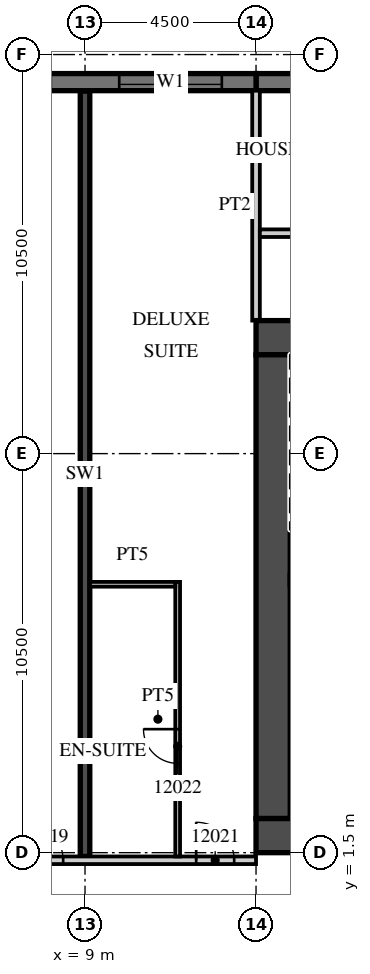
"""IFC4 building model, lengths in metres.
Left out: names, types, materials, properties, quantities, classifications, styles, units other than length and angle.
Written with IfcOpenShell. Run it as: python <this file> out.ifc"""

import sys

from ifc_helpers import new_model, si_unit, direction, frame, frame_2d, origin, place, context, subcontext, project, spatial, rectangle, extrude, element, fill, save


model = new_model("IFC4")
c1 = context("Model", 3, precision=1e-05, world=origin(), true_north=direction((0.0, 1.0)))
c2 = subcontext(c1, "Body", "Model", "MODEL_VIEW")
j1 = project(units=[si_unit("LENGTHUNIT", "METRE"), si_unit("PLANEANGLEUNIT", "RADIAN")], contexts=[c1])
p1 = place(None, origin())
s1 = spatial("IfcSite", under=j1, at=p1, CompositionType="ELEMENT")
p2 = place(p1, origin())
s2 = spatial("IfcBuilding", under=s1, at=p2, CompositionType="ELEMENT")
p3 = place(p2, frame((0.0, 0.0, 69.9)))
s3 = spatial("IfcBuildingStorey", under=s2, at=p3, CompositionType="ELEMENT", Elevation=69.9)
p4 = place(p3, frame((9.0, 1.4, 0.0), z_axis=(0.0, 0.0, 1.0), x_axis=(0.0, 1.0, 0.0)))
e1 = element("IfcWall", 1, at=p4, inside=s3, PredefinedType="SHEAR", context=c2, shape_type="SweptSolid", body=[
    extrude(rectangle(XDim=20.14, YDim=0.25, at=frame_2d((10.07, 0.0))), origin(), (0.0, 0.0, 1.0), 3.3),
])
p5 = place(p3, frame((31.5, 21.775, 0.0), z_axis=(0.0, 0.0, 1.0), x_axis=(-1.0, 0.0, 0.0)))
e2 = element("IfcWall", 2, at=p5, inside=s3, PredefinedType="SOLIDWALL", context=c2, shape_type="SweptSolid", body=[
    extrude(rectangle(XDim=18.0, YDim=0.45, at=frame_2d((9.0, 0.0))), origin(), (0.0, 0.0, 1.0), 3.02),
])
p6 = place(p3, frame((13.5, 21.775, 0.0), z_axis=(0.0, 0.0, 1.0), x_axis=(-1.0, 0.0, 0.0)))
e3 = element("IfcWall", 3, at=p6, inside=s3, PredefinedType="SOLIDWALL", context=c2, shape_type="SweptSolid", body=[
    extrude(rectangle(XDim=54.5, YDim=0.45, at=frame_2d((27.25, 0.0))), origin(), (0.0, 0.0, 1.0), 3.02),
])
p7 = place(p6, frame((0.9, 0.0, 0.45)))
e4 = element("IfcOpeningElement", 4, at=p7, cuts=e3, PredefinedType="OPENING", context=c2, shape_type="SweptSolid", body=[
    extrude(rectangle(XDim=2.7, YDim=2.25, at=frame_2d((1.35, 1.125))), frame((0.0, 0.235, 0.0), z_axis=(0.0, -1.0, 0.0), x_axis=(1.0, 0.0, 0.0)), (0.0, 0.0, 1.0), 0.47),
])
p8 = place(p6, frame((5.4, 0.0, 0.45)))
e5 = element("IfcOpeningElement", 5, at=p8, cuts=e3, PredefinedType="OPENING", context=c2, shape_type="SweptSolid", body=[
    extrude(rectangle(XDim=2.7, YDim=2.25, at=frame_2d((1.35, 1.125))), frame((0.0, 0.235, 0.0), z_axis=(0.0, -1.0, 0.0), x_axis=(1.0, 0.0, 0.0)), (0.0, 0.0, 1.0), 0.47),
])
p9 = place(p6, frame((9.9, 0.0, 0.45)))
e6 = element("IfcOpeningElement", 6, at=p9, cuts=e3, PredefinedType="OPENING", context=c2, shape_type="SweptSolid", body=[
    extrude(rectangle(XDim=2.7, YDim=2.25, at=frame_2d((1.35, 1.125))), frame((0.0, 0.235, 0.0), z_axis=(0.0, -1.0, 0.0), x_axis=(1.0, 0.0, 0.0)), (0.0, 0.0, 1.0), 0.47),
])
p10 = place(p6, frame((14.4, 0.0, 0.45)))
e7 = element("IfcOpeningElement", 7, at=p10, cuts=e3, PredefinedType="OPENING", context=c2, shape_type="SweptSolid", body=[
    extrude(rectangle(XDim=2.7, YDim=2.25, at=frame_2d((1.35, 1.125))), frame((0.0, 0.235, 0.0), z_axis=(0.0, -1.0, 0.0), x_axis=(1.0, 0.0, 0.0)), (0.0, 0.0, 1.0), 0.47),
])
p11 = place(p6, frame((18.9, 0.0, 0.45)))
e8 = element("IfcOpeningElement", 8, at=p11, cuts=e3, PredefinedType="OPENING", context=c2, shape_type="SweptSolid", body=[
    extrude(rectangle(XDim=2.7, YDim=2.25, at=frame_2d((1.35, 1.125))), frame((0.0, 0.235, 0.0), z_axis=(0.0, -1.0, 0.0), x_axis=(1.0, 0.0, 0.0)), (0.0, 0.0, 1.0), 0.47),
])
p12 = place(p6, frame((23.4, 0.0, 0.45)))
e9 = element("IfcOpeningElement", 9, at=p12, cuts=e3, PredefinedType="OPENING", context=c2, shape_type="SweptSolid", body=[
    extrude(rectangle(XDim=2.7, YDim=2.25, at=frame_2d((1.35, 1.125))), frame((0.0, 0.235, 0.0), z_axis=(0.0, -1.0, 0.0), x_axis=(1.0, 0.0, 0.0)), (0.0, 0.0, 1.0), 0.47),
])
p13 = place(p6, frame((27.9, 0.0, 0.45)))
e10 = element("IfcOpeningElement", 10, at=p13, cuts=e3, PredefinedType="OPENING", context=c2, shape_type="SweptSolid", body=[
    extrude(rectangle(XDim=2.7, YDim=2.25, at=frame_2d((1.35, 1.125))), frame((0.0, 0.235, 0.0), z_axis=(0.0, -1.0, 0.0), x_axis=(1.0, 0.0, 0.0)), (0.0, 0.0, 1.0), 0.47),
])
p14 = place(p6, frame((32.4, 0.0, 0.45)))
e11 = element("IfcOpeningElement", 11, at=p14, cuts=e3, PredefinedType="OPENING", context=c2, shape_type="SweptSolid", body=[
    extrude(rectangle(XDim=2.7, YDim=2.25, at=frame_2d((1.35, 1.125))), frame((0.0, 0.235, 0.0), z_axis=(0.0, -1.0, 0.0), x_axis=(1.0, 0.0, 0.0)), (0.0, 0.0, 1.0), 0.47),
])
p15 = place(p6, frame((36.9, 0.0, 0.45)))
e12 = element("IfcOpeningElement", 12, at=p15, cuts=e3, PredefinedType="OPENING", context=c2, shape_type="SweptSolid", body=[
    extrude(rectangle(XDim=2.7, YDim=2.25, at=frame_2d((1.35, 1.125))), frame((0.0, 0.235, 0.0), z_axis=(0.0, -1.0, 0.0), x_axis=(1.0, 0.0, 0.0)), (0.0, 0.0, 1.0), 0.47),
])
p16 = place(p6, frame((41.4, 0.0, 0.45)))
e13 = element("IfcOpeningElement", 13, at=p16, cuts=e3, PredefinedType="OPENING", context=c2, shape_type="SweptSolid", body=[
    extrude(rectangle(XDim=2.7, YDim=2.25, at=frame_2d((1.35, 1.125))), frame((0.0, 0.235, 0.0), z_axis=(0.0, -1.0, 0.0), x_axis=(1.0, 0.0, 0.0)), (0.0, 0.0, 1.0), 0.47),
])
p17 = place(p6, frame((45.9, 0.0, 0.45)))
e14 = element("IfcOpeningElement", 14, at=p17, cuts=e3, PredefinedType="OPENING", context=c2, shape_type="SweptSolid", body=[
    extrude(rectangle(XDim=2.7, YDim=2.25, at=frame_2d((1.35, 1.125))), frame((0.0, 0.235, 0.0), z_axis=(0.0, -1.0, 0.0), x_axis=(1.0, 0.0, 0.0)), (0.0, 0.0, 1.0), 0.47),
])
p18 = place(p6, frame((50.4, 0.0, 0.45)))
e15 = element("IfcOpeningElement", 15, at=p18, cuts=e3, PredefinedType="OPENING", context=c2, shape_type="SweptSolid", body=[
    extrude(rectangle(XDim=2.7, YDim=2.25, at=frame_2d((1.35, 1.125))), frame((0.0, 0.235, 0.0), z_axis=(0.0, -1.0, 0.0), x_axis=(1.0, 0.0, 0.0)), (0.0, 0.0, 1.0), 0.47),
])
p19 = place(p3, frame((13.5, 15.5, 0.0), z_axis=(0.0, 0.0, 1.0), x_axis=(0.0, 1.0, 0.0)))
e16 = element("IfcWall", 16, at=p19, inside=s3, PredefinedType="PARTITIONING", context=c2, shape_type="SweptSolid", body=[
    extrude(rectangle(XDim=6.05, YDim=0.2, at=frame_2d((3.025, 0.0))), origin(), (0.0, 0.0, 1.0), 3.02),
])
p20 = place(p3, frame((-44.55, 1.3, 0.0), z_axis=(0.0, 0.0, 1.0), x_axis=(1.0, 0.0, 0.0)))
e17 = element("IfcWall", 17, at=p20, inside=s3, PredefinedType="PARTITIONING", context=c2, shape_type="SweptSolid", body=[
    extrude(rectangle(XDim=58.05, YDim=0.2, at=frame_2d((29.025, 0.0))), origin(), (0.0, 0.0, 1.0), 3.02),
])
p21 = place(p20, frame((0.525, 0.0, 0.0)))
e18 = element("IfcOpeningElement", 18, at=p21, cuts=e17, PredefinedType="OPENING", context=c2, shape_type="SweptSolid", body=[
    extrude(rectangle(XDim=1.0, YDim=2.1, at=frame_2d((0.5, 1.05))), frame((0.0, 0.11, 0.0), z_axis=(0.0, -1.0, 0.0), x_axis=(1.0, 0.0, 0.0)), (0.0, 0.0, 1.0), 0.22),
])
p22 = place(p20, frame((6.975, 0.0, 0.0)))
e19 = element("IfcOpeningElement", 19, at=p22, cuts=e17, PredefinedType="OPENING", context=c2, shape_type="SweptSolid", body=[
    extrude(rectangle(XDim=1.0, YDim=2.1, at=frame_2d((0.5, 1.05))), frame((0.0, 0.11, 0.0), z_axis=(0.0, -1.0, 0.0), x_axis=(1.0, 0.0, 0.0)), (0.0, 0.0, 1.0), 0.22),
])
p23 = place(p20, frame((9.125, 0.0, 0.0)))
e20 = element("IfcOpeningElement", 20, at=p23, cuts=e17, PredefinedType="OPENING", context=c2, shape_type="SweptSolid", body=[
    extrude(rectangle(XDim=1.0, YDim=2.1, at=frame_2d((0.5, 1.05))), frame((0.0, 0.11, 0.0), z_axis=(0.0, -1.0, 0.0), x_axis=(1.0, 0.0, 0.0)), (0.0, 0.0, 1.0), 0.22),
])
p24 = place(p20, frame((13.6, 0.0, 0.0)))
e21 = element("IfcOpeningElement", 21, at=p24, cuts=e17, PredefinedType="OPENING", context=c2, shape_type="SweptSolid", body=[
    extrude(rectangle(XDim=1.0, YDim=2.1, at=frame_2d((0.5, 1.05))), frame((0.0, 0.11, 0.0), z_axis=(0.0, -1.0, 0.0), x_axis=(1.0, 0.0, 0.0)), (0.0, 0.0, 1.0), 0.22),
])
p25 = place(p20, frame((19.987, 0.0, 0.0)))
e22 = element("IfcOpeningElement", 22, at=p25, cuts=e17, PredefinedType="OPENING", context=c2, shape_type="SweptSolid", body=[
    extrude(rectangle(XDim=1.2, YDim=2.1, at=frame_2d((0.6, 1.05))), frame((0.0, 0.11, 0.0), z_axis=(0.0, -1.0, 0.0), x_axis=(1.0, 0.0, 0.0)), (0.0, 0.0, 1.0), 0.22),
])
p26 = place(p20, frame((31.912, 0.0, 0.0)))
e23 = element("IfcOpeningElement", 23, at=p26, cuts=e17, PredefinedType="OPENING", context=c2, shape_type="SweptSolid", body=[
    extrude(rectangle(XDim=1.2, YDim=2.1, at=frame_2d((0.6, 1.05))), frame((0.0, 0.11, 0.0), z_axis=(0.0, -1.0, 0.0), x_axis=(1.0, 0.0, 0.0)), (0.0, 0.0, 1.0), 0.22),
])
p27 = place(p20, frame((38.5, 0.0, 0.0)))
e24 = element("IfcOpeningElement", 24, at=p27, cuts=e17, PredefinedType="OPENING", context=c2, shape_type="SweptSolid", body=[
    extrude(rectangle(XDim=1.0, YDim=2.1, at=frame_2d((0.5, 1.05))), frame((0.0, 0.11, 0.0), z_axis=(0.0, -1.0, 0.0), x_axis=(1.0, 0.0, 0.0)), (0.0, 0.0, 1.0), 0.22),
])
p28 = place(p20, frame((40.6, 0.0, 0.0)))
e25 = element("IfcOpeningElement", 25, at=p28, cuts=e17, PredefinedType="OPENING", context=c2, shape_type="SweptSolid", body=[
    extrude(rectangle(XDim=1.0, YDim=2.1, at=frame_2d((0.5, 1.05))), frame((0.0, 0.11, 0.0), z_axis=(0.0, -1.0, 0.0), x_axis=(1.0, 0.0, 0.0)), (0.0, 0.0, 1.0), 0.22),
])
p29 = place(p20, frame((47.5, 0.0, 0.0)))
e26 = element("IfcOpeningElement", 26, at=p29, cuts=e17, PredefinedType="OPENING", context=c2, shape_type="SweptSolid", body=[
    extrude(rectangle(XDim=1.0, YDim=2.1, at=frame_2d((0.5, 1.05))), frame((0.0, 0.11, 0.0), z_axis=(0.0, -1.0, 0.0), x_axis=(1.0, 0.0, 0.0)), (0.0, 0.0, 1.0), 0.22),
])
p30 = place(p20, frame((51.975, 0.0, 0.0)))
e27 = element("IfcOpeningElement", 27, at=p30, cuts=e17, PredefinedType="OPENING", context=c2, shape_type="SweptSolid", body=[
    extrude(rectangle(XDim=1.0, YDim=2.1, at=frame_2d((0.5, 1.05))), frame((0.0, 0.11, 0.0), z_axis=(0.0, -1.0, 0.0), x_axis=(1.0, 0.0, 0.0)), (0.0, 0.0, 1.0), 0.22),
])
p31 = place(p20, frame((56.475, 0.0, 0.0)))
e28 = element("IfcOpeningElement", 28, at=p31, cuts=e17, PredefinedType="OPENING", context=c2, shape_type="SweptSolid", body=[
    extrude(rectangle(XDim=1.0, YDim=2.1, at=frame_2d((0.5, 1.05))), frame((0.0, 0.11, 0.0), z_axis=(0.0, -1.0, 0.0), x_axis=(1.0, 0.0, 0.0)), (0.0, 0.0, 1.0), 0.22),
])
p32 = place(p3, frame((11.438, 1.4, 0.0), z_axis=(0.0, 0.0, 1.0), x_axis=(0.0, 1.0, 0.0)))
e29 = element("IfcWall", 29, at=p32, inside=s3, PredefinedType="PARTITIONING", context=c2, shape_type="SweptSolid", body=[
    extrude(rectangle(XDim=7.225, YDim=0.125, at=frame_2d((3.613, 0.0))), origin(), (0.0, 0.0, 1.0), 3.02),
])
p33 = place(p32, frame((2.45, 0.0, 0.0)))
e30 = element("IfcOpeningElement", 30, at=p33, cuts=e29, PredefinedType="OPENING", context=c2, shape_type="SweptSolid", body=[
    extrude(rectangle(XDim=0.9, YDim=2.1, at=frame_2d((0.45, 1.05))), frame((0.0, 0.073, 0.0), z_axis=(0.0, -1.0, 0.0), x_axis=(1.0, 0.0, 0.0)), (0.0, 0.0, 1.0), 0.145),
])
p34 = place(p3, frame((9.125, 8.562, 0.0), z_axis=(0.0, 0.0, 1.0), x_axis=(1.0, 0.0, 0.0)))
e31 = element("IfcWall", 31, at=p34, inside=s3, PredefinedType="PARTITIONING", context=c2, shape_type="SweptSolid", body=[
    extrude(rectangle(XDim=2.25, YDim=0.125, at=frame_2d((1.125, 0.0))), origin(), (0.0, 0.0, 1.0), 3.02),
])
p35 = place(p3, frame((13.5, 1.95, 0.0), z_axis=(0.0, 0.0, 1.0), x_axis=(1.0, 0.0, 0.0)))
e32 = element("IfcWall", 32, at=p35, inside=s3, PredefinedType="SHEAR", context=c2, shape_type="SweptSolid", body=[
    extrude(rectangle(XDim=18.0, YDim=0.9, at=frame_2d((9.0, 0.0))), origin(), (0.0, 0.0, 1.0), 3.02),
])
p36 = place(p35, frame((1.475, 0.0, 0.0)))
e33 = element("IfcOpeningElement", 33, at=p36, cuts=e32, PredefinedType="OPENING", context=c2, shape_type="SweptSolid", body=[
    extrude(rectangle(XDim=1.8, YDim=2.1, at=frame_2d((0.9, 1.05))), frame((0.0, 0.46, 0.0), z_axis=(0.0, -1.0, 0.0), x_axis=(1.0, 0.0, 0.0)), (0.0, 0.0, 1.0), 0.92),
])
p37 = place(p3, frame((13.5, 15.05, 0.0), z_axis=(0.0, 0.0, 1.0), x_axis=(1.0, 0.0, 0.0)))
e34 = element("IfcWall", 34, at=p37, inside=s3, PredefinedType="SHEAR", context=c2, shape_type="SweptSolid", body=[
    extrude(rectangle(XDim=6.8, YDim=0.9, at=frame_2d((3.4, 0.0))), origin(), (0.0, 0.0, 1.0), 3.02),
])
p38 = place(p37, frame((4.725, 0.0, 0.0)))
e35 = element("IfcOpeningElement", 35, at=p38, cuts=e34, PredefinedType="OPENING", context=c2, shape_type="SweptSolid", body=[
    extrude(rectangle(XDim=1.2, YDim=2.1, at=frame_2d((0.6, 1.05))), frame((0.0, 0.46, 0.0), z_axis=(0.0, -1.0, 0.0), x_axis=(1.0, 0.0, 0.0)), (0.0, 0.0, 1.0), 0.92),
])
p39 = place(p3, frame((13.95, 2.4, 0.0), z_axis=(0.0, 0.0, 1.0), x_axis=(0.0, 1.0, 0.0)))
e36 = element("IfcWall", 36, at=p39, inside=s3, PredefinedType="SHEAR", context=c2, shape_type="SweptSolid", body=[
    extrude(rectangle(XDim=12.2, YDim=0.9, at=frame_2d((6.1, 0.0))), origin(), (0.0, 0.0, 1.0), 3.02),
])
p40 = place(p3, frame((13.6, 17.8, 0.0), z_axis=(0.0, 0.0, 1.0), x_axis=(1.0, 0.0, 0.0)))
e37 = element("IfcWall", 37, at=p40, inside=s3, PredefinedType="PARTITIONING", context=c2, shape_type="SweptSolid", body=[
    extrude(rectangle(XDim=30.95, YDim=0.2, at=frame_2d((15.475, 0.0))), origin(), (0.0, 0.0, 1.0), 3.02),
])
p41 = place(p40, frame((17.812, 0.0, 0.0)))
e38 = element("IfcOpeningElement", 38, at=p41, cuts=e37, PredefinedType="OPENING", context=c2, shape_type="SweptSolid", body=[
    extrude(rectangle(XDim=0.9, YDim=2.1, at=frame_2d((0.45, 1.05))), frame((0.0, 0.11, 0.0), z_axis=(0.0, -1.0, 0.0), x_axis=(1.0, 0.0, 0.0)), (0.0, 0.0, 1.0), 0.22),
])
p42 = place(p40, frame((9.512, 0.0, 0.0)))
e39 = element("IfcOpeningElement", 39, at=p42, cuts=e37, PredefinedType="OPENING", context=c2, shape_type="SweptSolid", body=[
    extrude(rectangle(XDim=0.9, YDim=2.1, at=frame_2d((0.45, 1.05))), frame((0.0, 0.11, 0.0), z_axis=(0.0, -1.0, 0.0), x_axis=(1.0, 0.0, 0.0)), (0.0, 0.0, 1.0), 0.22),
])
p43 = place(p7, origin())
e40 = element("IfcWindow", 40, at=p43, inside=s3, PartitioningType="SINGLE_PANEL", PredefinedType="WINDOW", context=c2, shape_type="SweptSolid", body=[
    extrude(rectangle(XDim=2.7, YDim=2.25, at=frame_2d((1.35, 1.125))), frame((0.0, 0.09, 0.0), z_axis=(0.0, -1.0, 0.0), x_axis=(1.0, 0.0, 0.0)), (0.0, 0.0, 1.0), 0.06),
])
fill(e4, e40)
p44 = place(p30, origin())
e41 = element("IfcDoor", 41, at=p44, inside=s3, OperationType="SINGLE_SWING_LEFT", PredefinedType="DOOR", context=c2, shape_type="SweptSolid", body=[
    extrude(rectangle(XDim=1.0, YDim=2.1, at=frame_2d((0.5, 1.05))), frame((0.0, 0.025, 0.0), z_axis=(0.0, -1.0, 0.0), x_axis=(1.0, 0.0, 0.0)), (0.0, 0.0, 1.0), 0.05),
])
fill(e27, e41)
p45 = place(p31, origin())
e42 = element("IfcDoor", 42, at=p45, inside=s3, OperationType="SINGLE_SWING_LEFT", PredefinedType="DOOR", context=c2, shape_type="SweptSolid", body=[
    extrude(rectangle(XDim=1.0, YDim=2.1, at=frame_2d((0.5, 1.05))), frame((0.0, 0.025, 0.0), z_axis=(0.0, -1.0, 0.0), x_axis=(1.0, 0.0, 0.0)), (0.0, 0.0, 1.0), 0.05),
])
fill(e28, e42)
p46 = place(p33, origin())
e43 = element("IfcDoor", 43, at=p46, inside=s3, OperationType="SINGLE_SWING_RIGHT", PredefinedType="DOOR", context=c2, shape_type="SweptSolid", body=[
    extrude(rectangle(XDim=0.9, YDim=2.1, at=frame_2d((0.45, 1.05))), frame((0.0, 0.025, 0.0), z_axis=(0.0, -1.0, 0.0), x_axis=(1.0, 0.0, 0.0)), (0.0, 0.0, 1.0), 0.05),
])
fill(e30, e43)
save(model, sys.argv[1])
